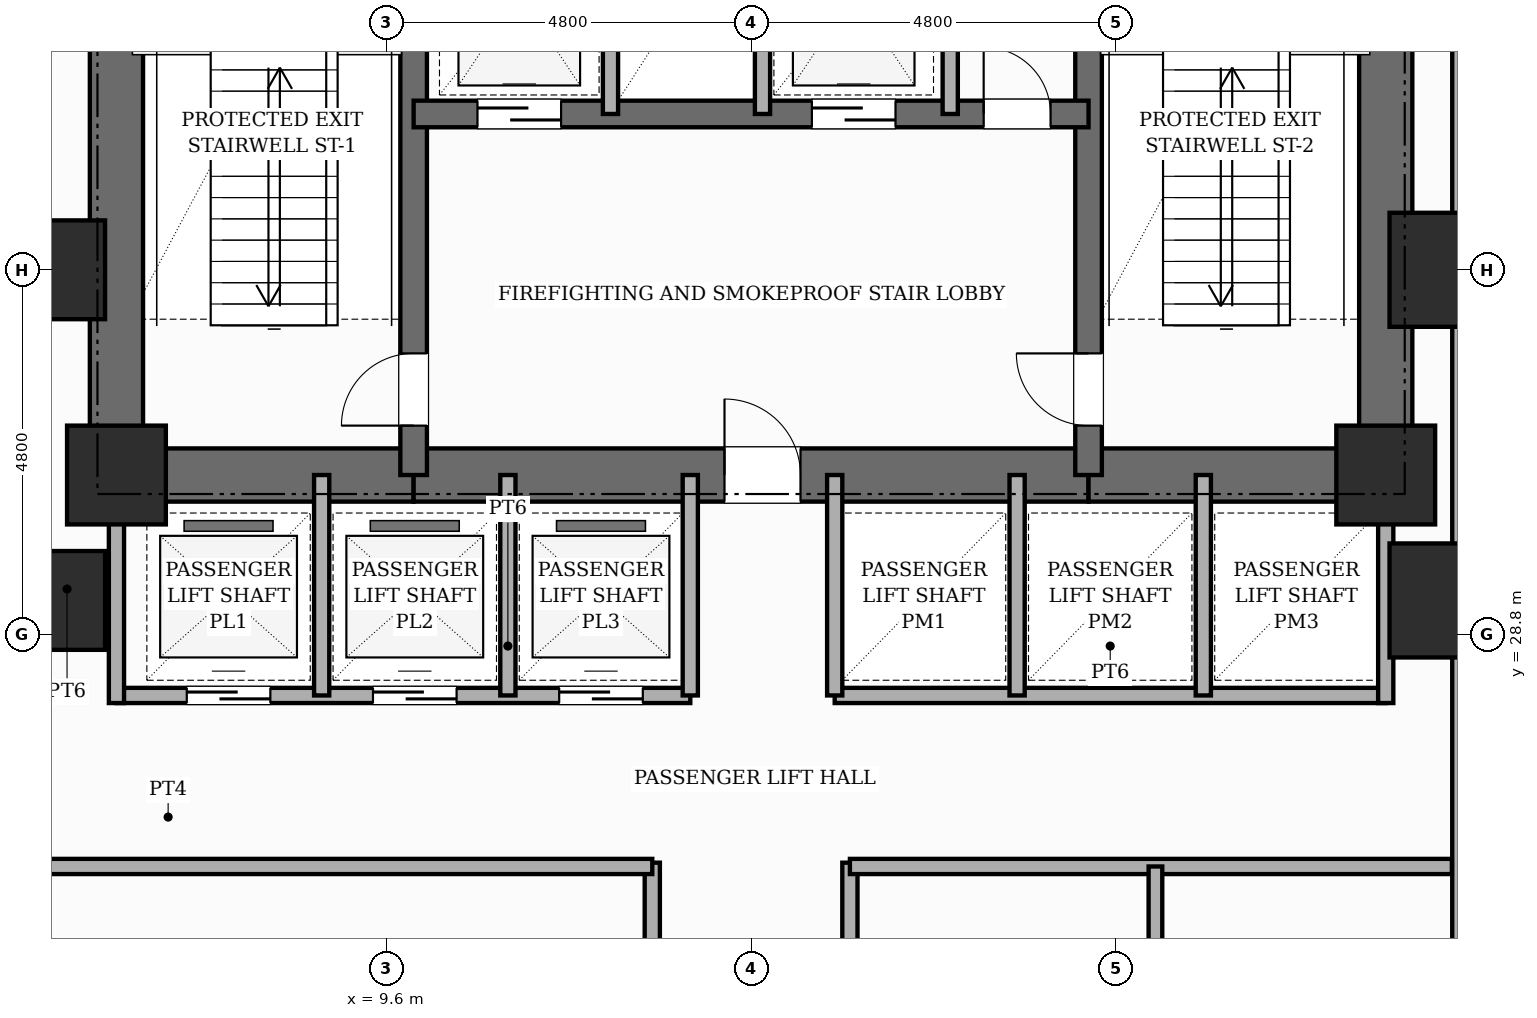
"""IFC4 building model, lengths in metres.
Left out: names, types, materials, properties, quantities, classifications, styles, units other than length and angle.
Written with IfcOpenShell. Run it as: python <this file> out.ifc"""

import sys

from ifc_helpers import new_model, si_unit, direction, frame, frame_2d, origin, origin_2d, place, context, subcontext, project, spatial, rectangle, extrude, element, fill, save


model = new_model("IFC4")
c1 = context("Model", 3, precision=1e-05, world=origin(), true_north=direction((0.0, 1.0)))
c2 = subcontext(c1, "Body", "Model", "MODEL_VIEW")
j1 = project(units=[si_unit("LENGTHUNIT", "METRE"), si_unit("PLANEANGLEUNIT", "RADIAN")], contexts=[c1])
p1 = place(None, origin())
s1 = spatial("IfcSite", under=j1, at=p1, CompositionType="ELEMENT")
p2 = place(p1, origin())
s2 = spatial("IfcBuilding", under=s1, at=p2, CompositionType="ELEMENT")
p3 = place(p2, frame((0.0, 0.0, 5.2)))
s3 = spatial("IfcBuildingStorey", under=s2, at=p3, CompositionType="ELEMENT", Elevation=5.2)
p4 = place(p3, frame((6.05, 30.55, 0.0), z_axis=(0.0, 0.0, 1.0), x_axis=(0.0, 1.0, 0.0)))
e1 = element("IfcWall", 1, at=p4, inside=s3, PredefinedType="SHEAR", context=c2, shape_type="SweptSolid", body=[
    extrude(rectangle(XDim=15.6, YDim=0.7, at=frame_2d((7.8, 0.0))), origin(), (0.0, 0.0, 1.0), 4.8),
])
p5 = place(p3, frame((22.75, 30.55, 0.0), z_axis=(0.0, 0.0, 1.0), x_axis=(0.0, 1.0, 0.0)))
e2 = element("IfcWall", 2, at=p5, inside=s3, PredefinedType="SHEAR", context=c2, shape_type="SweptSolid", body=[
    extrude(rectangle(XDim=15.6, YDim=0.7, at=frame_2d((7.8, 0.0))), origin(), (0.0, 0.0, 1.0), 4.8),
])
p6 = place(p5, frame((10.8, 0.0, 0.0)))
e3 = element("IfcOpeningElement", 3, at=p6, cuts=e2, PredefinedType="OPENING", context=c2, shape_type="SweptSolid", body=[
    extrude(rectangle(XDim=1.0, YDim=2.15, at=frame_2d((0.5, 1.075))), frame((0.0, 0.36, 0.0), z_axis=(0.0, -1.0, 0.0), x_axis=(1.0, 0.0, 0.0)), (0.0, 0.0, 1.0), 0.72),
])
p7 = place(p3, frame((6.05, 30.9, 0.0), z_axis=(0.0, 0.0, 1.0), x_axis=(1.0, 0.0, 0.0)))
e4 = element("IfcWall", 4, at=p7, inside=s3, PredefinedType="SHEAR", context=c2, shape_type="SweptSolid", body=[
    extrude(rectangle(XDim=3.91, YDim=0.7, at=frame_2d((1.955, 0.0))), origin(), (0.0, 0.0, 1.0), 4.8),
])
p8 = place(p3, frame((9.96, 30.9, 0.0), z_axis=(0.0, 0.0, 1.0), x_axis=(1.0, 0.0, 0.0)))
e5 = element("IfcWall", 5, at=p8, inside=s3, PredefinedType="SHEAR", context=c2, shape_type="SweptSolid", body=[
    extrude(rectangle(XDim=8.88, YDim=0.7, at=frame_2d((4.44, 0.0))), origin(), (0.0, 0.0, 1.0), 4.8),
])
p9 = place(p8, frame((4.09, 0.0, 0.0)))
e6 = element("IfcOpeningElement", 6, at=p9, cuts=e5, PredefinedType="OPENING", context=c2, shape_type="SweptSolid", body=[
    extrude(rectangle(XDim=1.0, YDim=2.15, at=frame_2d((0.5, 1.075))), frame((0.0, 0.36, 0.0), z_axis=(0.0, -1.0, 0.0), x_axis=(1.0, 0.0, 0.0)), (0.0, 0.0, 1.0), 0.72),
])
p10 = place(p3, frame((18.84, 30.9, 0.0), z_axis=(0.0, 0.0, 1.0), x_axis=(1.0, 0.0, 0.0)))
e7 = element("IfcWall", 7, at=p10, inside=s3, PredefinedType="SHEAR", context=c2, shape_type="SweptSolid", body=[
    extrude(rectangle(XDim=3.91, YDim=0.7, at=frame_2d((1.955, 0.0))), origin(), (0.0, 0.0, 1.0), 4.8),
])
p11 = place(p3, frame((9.96, 30.9, 0.0), z_axis=(0.0, 0.0, 1.0), x_axis=(0.0, 1.0, 0.0)))
e8 = element("IfcWall", 8, at=p11, inside=s3, PredefinedType="SHEAR", context=c2, shape_type="SweptSolid", body=[
    extrude(rectangle(XDim=14.9, YDim=0.35, at=frame_2d((7.45, 0.0))), origin(), (0.0, 0.0, 1.0), 4.8),
])
p12 = place(p11, frame((0.65, 0.0, 0.0)))
e9 = element("IfcOpeningElement", 9, at=p12, cuts=e8, PredefinedType="OPENING", context=c2, shape_type="SweptSolid", body=[
    extrude(rectangle(XDim=0.95, YDim=2.1, at=frame_2d((0.475, 1.05))), frame((0.0, 0.185, 0.0), z_axis=(0.0, -1.0, 0.0), x_axis=(1.0, 0.0, 0.0)), (0.0, 0.0, 1.0), 0.37),
])
p13 = place(p11, frame((10.45, 0.0, 0.0)))
e10 = element("IfcOpeningElement", 10, at=p13, cuts=e8, PredefinedType="OPENING", context=c2, shape_type="SweptSolid", body=[
    extrude(rectangle(XDim=1.0, YDim=2.15, at=frame_2d((0.5, 1.075))), frame((0.0, 0.185, 0.0), z_axis=(0.0, -1.0, 0.0), x_axis=(1.0, 0.0, 0.0)), (0.0, 0.0, 1.0), 0.37),
])
p14 = place(p3, frame((18.84, 30.9, 0.0), z_axis=(0.0, 0.0, 1.0), x_axis=(0.0, 1.0, 0.0)))
e11 = element("IfcWall", 11, at=p14, inside=s3, PredefinedType="SHEAR", context=c2, shape_type="SweptSolid", body=[
    extrude(rectangle(XDim=14.9, YDim=0.35, at=frame_2d((7.45, 0.0))), origin(), (0.0, 0.0, 1.0), 4.8),
])
p15 = place(p14, frame((0.65, 0.0, 0.0)))
e12 = element("IfcOpeningElement", 12, at=p15, cuts=e11, PredefinedType="OPENING", context=c2, shape_type="SweptSolid", body=[
    extrude(rectangle(XDim=0.95, YDim=2.1, at=frame_2d((0.475, 1.05))), frame((0.0, 0.185, 0.0), z_axis=(0.0, -1.0, 0.0), x_axis=(1.0, 0.0, 0.0)), (0.0, 0.0, 1.0), 0.37),
])
p16 = place(p14, frame((10.45, 0.0, 0.0)))
e13 = element("IfcOpeningElement", 13, at=p16, cuts=e11, PredefinedType="OPENING", context=c2, shape_type="SweptSolid", body=[
    extrude(rectangle(XDim=1.0, YDim=2.15, at=frame_2d((0.5, 1.075))), frame((0.0, 0.185, 0.0), z_axis=(0.0, -1.0, 0.0), x_axis=(1.0, 0.0, 0.0)), (0.0, 0.0, 1.0), 0.37),
])
p17 = place(p3, frame((9.96, 35.65, 0.0), z_axis=(0.0, 0.0, 1.0), x_axis=(1.0, 0.0, 0.0)))
e14 = element("IfcWall", 14, at=p17, inside=s3, PredefinedType="SHEAR", context=c2, shape_type="SweptSolid", body=[
    extrude(rectangle(XDim=8.88, YDim=0.35, at=frame_2d((4.44, 0.0))), origin(), (0.0, 0.0, 1.0), 4.8),
])
p18 = place(p17, frame((0.84, 0.0, 0.0)))
e15 = element("IfcOpeningElement", 15, at=p18, cuts=e14, PredefinedType="OPENING", context=c2, shape_type="SweptSolid", body=[
    extrude(rectangle(XDim=1.1, YDim=2.15, at=frame_2d((0.55, 1.075))), frame((0.0, 0.185, 0.0), z_axis=(0.0, -1.0, 0.0), x_axis=(1.0, 0.0, 0.0)), (0.0, 0.0, 1.0), 0.37),
])
p19 = place(p17, frame((5.24, 0.0, 0.0)))
e16 = element("IfcOpeningElement", 16, at=p19, cuts=e14, PredefinedType="OPENING", context=c2, shape_type="SweptSolid", body=[
    extrude(rectangle(XDim=1.1, YDim=2.15, at=frame_2d((0.55, 1.075))), frame((0.0, 0.185, 0.0), z_axis=(0.0, -1.0, 0.0), x_axis=(1.0, 0.0, 0.0)), (0.0, 0.0, 1.0), 0.37),
])
p20 = place(p17, frame((7.5, 0.0, 0.0)))
e17 = element("IfcOpeningElement", 17, at=p20, cuts=e14, PredefinedType="OPENING", context=c2, shape_type="SweptSolid", body=[
    extrude(rectangle(XDim=0.88, YDim=2.1, at=frame_2d((0.44, 1.05))), frame((0.0, 0.185, 0.0), z_axis=(0.0, -1.0, 0.0), x_axis=(1.0, 0.0, 0.0)), (0.0, 0.0, 1.0), 0.37),
])
for number, where, z_axis, x_axis in (
    (18, (5.25, 29.25, 0.0), (0.0, 0.0, 1.0), (1.0, 0.0, 0.0)),
    (19, (5.25, 33.6, 0.0), (0.0, 0.0, 1.0), (1.0, 0.0, 0.0)),
    (20, (6.05, 30.9, 0.0), (0.0, 0.0, 1.0), (1.0, 0.0, 0.0)),
    (21, (22.75, 30.9, 0.0), (0.0, 0.0, 1.0), (1.0, 0.0, 0.0)),
):
    element("IfcColumn", number, at=place(p3, frame(where, z_axis=z_axis, x_axis=x_axis)), inside=s3, PredefinedType="COLUMN", context=c2, shape_type="SweptSolid", body=[
        extrude(rectangle(XDim=1.3, YDim=1.3, at=origin_2d()), origin(), (0.0, 0.0, 1.0), 4.8),
    ])
for number, where, z_axis, x_axis in (
    (22, (23.55, 29.25, 0.0), (0.0, 0.0, 1.0), (1.0, 0.0, 0.0)),
    (23, (23.55, 33.6, 0.0), (0.0, 0.0, 1.0), (1.0, 0.0, 0.0)),
):
    element("IfcColumn", number, at=place(p3, frame(where, z_axis=z_axis, x_axis=x_axis)), inside=s3, PredefinedType="USERDEFINED", context=c2, shape_type="SweptSolid", body=[
        extrude(rectangle(XDim=1.5, YDim=1.5, at=origin_2d()), origin(), (0.0, 0.0, 1.0), 4.8),
    ])
p21 = place(p3, frame((23.825, 48.0, 0.0), z_axis=(0.0, 0.0, 1.0), x_axis=(0.0, -1.0, 0.0)))
e24 = element("IfcWall", 24, at=p21, inside=s3, PredefinedType="SOLIDWALL", context=c2, shape_type="SweptSolid", body=[
    extrude(rectangle(XDim=30.24, YDim=0.4, at=frame_2d((15.12, 0.0))), origin(), (0.0, 0.0, 1.0), 3.6),
])
p22 = place(p21, frame((25.65, 0.0, 0.85)))
e25 = element("IfcOpeningElement", 25, at=p22, cuts=e24, PredefinedType="OPENING", context=c2, shape_type="SweptSolid", body=[
    extrude(rectangle(XDim=1.5, YDim=2.1, at=frame_2d((0.75, 1.05))), frame((0.0, 0.21, 0.0), z_axis=(0.0, -1.0, 0.0), x_axis=(1.0, 0.0, 0.0)), (0.0, 0.0, 1.0), 0.42),
])
for number, where, z_axis, x_axis in (
    (26, (12.55, 35.65, 0.0), (0.0, 0.0, 1.0), (0.0, 1.0, 0.0)),
    (27, (14.55, 35.65, 0.0), (0.0, 0.0, 1.0), (0.0, 1.0, 0.0)),
):
    element("IfcWall", number, at=place(p3, frame(where, z_axis=z_axis, x_axis=x_axis)), inside=s3, PredefinedType="POLYGONAL", context=c2, shape_type="SweptSolid", body=[
        extrude(rectangle(XDim=3.07, YDim=0.2, at=frame_2d((1.535, 0.0))), origin(), (0.0, 0.0, 1.0), 4.52),
    ])
p23 = place(p3, frame((17.02, 35.65, 0.0), z_axis=(0.0, 0.0, 1.0), x_axis=(0.0, 1.0, 0.0)))
e28 = element("IfcWall", 28, at=p23, inside=s3, PredefinedType="POLYGONAL", context=c2, shape_type="SweptSolid", body=[
    extrude(rectangle(XDim=5.15, YDim=0.2, at=frame_2d((2.575, 0.0))), origin(), (0.0, 0.0, 1.0), 4.52),
])
p24 = place(p3, frame((6.05, 28.0, 0.0), z_axis=(0.0, 0.0, 1.0), x_axis=(1.0, 0.0, 0.0)))
e29 = element("IfcWall", 29, at=p24, inside=s3, PredefinedType="POLYGONAL", context=c2, shape_type="SweptSolid", body=[
    extrude(rectangle(XDim=7.55, YDim=0.2, at=frame_2d((3.775, 0.0))), origin(), (0.0, 0.0, 1.0), 4.52),
])
p25 = place(p24, frame((0.925, 0.0, 0.0)))
e30 = element("IfcOpeningElement", 30, at=p25, cuts=e29, PredefinedType="OPENING", context=c2, shape_type="SweptSolid", body=[
    extrude(rectangle(XDim=1.1, YDim=2.15, at=frame_2d((0.55, 1.075))), frame((0.0, 0.11, 0.0), z_axis=(0.0, -1.0, 0.0), x_axis=(1.0, 0.0, 0.0)), (0.0, 0.0, 1.0), 0.22),
])
p26 = place(p24, frame((3.375, 0.0, 0.0)))
e31 = element("IfcOpeningElement", 31, at=p26, cuts=e29, PredefinedType="OPENING", context=c2, shape_type="SweptSolid", body=[
    extrude(rectangle(XDim=1.1, YDim=2.15, at=frame_2d((0.55, 1.075))), frame((0.0, 0.11, 0.0), z_axis=(0.0, -1.0, 0.0), x_axis=(1.0, 0.0, 0.0)), (0.0, 0.0, 1.0), 0.22),
])
p27 = place(p24, frame((5.825, 0.0, 0.0)))
e32 = element("IfcOpeningElement", 32, at=p27, cuts=e29, PredefinedType="OPENING", context=c2, shape_type="SweptSolid", body=[
    extrude(rectangle(XDim=1.1, YDim=2.15, at=frame_2d((0.55, 1.075))), frame((0.0, 0.11, 0.0), z_axis=(0.0, -1.0, 0.0), x_axis=(1.0, 0.0, 0.0)), (0.0, 0.0, 1.0), 0.22),
])
p28 = place(p3, frame((15.5, 28.0, 0.0), z_axis=(0.0, 0.0, 1.0), x_axis=(1.0, 0.0, 0.0)))
e33 = element("IfcWall", 33, at=p28, inside=s3, PredefinedType="POLYGONAL", context=c2, shape_type="SweptSolid", body=[
    extrude(rectangle(XDim=7.25, YDim=0.2, at=frame_2d((3.625, 0.0))), origin(), (0.0, 0.0, 1.0), 4.52),
])
for number, where, z_axis, x_axis in (
    (34, (6.05, 27.9, 0.0), (0.0, 0.0, 1.0), (0.0, 1.0, 0.0)),
    (35, (22.75, 27.9, 0.0), (0.0, 0.0, 1.0), (0.0, 1.0, 0.0)),
):
    element("IfcWall", number, at=place(p3, frame(where, z_axis=z_axis, x_axis=x_axis)), inside=s3, PredefinedType="POLYGONAL", context=c2, shape_type="SweptSolid", body=[
        extrude(rectangle(XDim=3.0, YDim=0.2, at=frame_2d((1.5, 0.0))), origin(), (0.0, 0.0, 1.0), 4.52),
    ])
for number, where, z_axis, x_axis in (
    (36, (13.6, 28.0, 0.0), (0.0, 0.0, 1.0), (0.0, 1.0, 0.0)),
    (37, (15.5, 28.0, 0.0), (0.0, 0.0, 1.0), (0.0, 1.0, 0.0)),
    (38, (8.75, 28.0, 0.0), (0.0, 0.0, 1.0), (0.0, 1.0, 0.0)),
    (39, (11.2, 28.0, 0.0), (0.0, 0.0, 1.0), (0.0, 1.0, 0.0)),
    (40, (17.9, 28.0, 0.0), (0.0, 0.0, 1.0), (0.0, 1.0, 0.0)),
    (41, (20.35, 28.0, 0.0), (0.0, 0.0, 1.0), (0.0, 1.0, 0.0)),
):
    element("IfcWall", number, at=place(p3, frame(where, z_axis=z_axis, x_axis=x_axis)), inside=s3, PredefinedType="POLYGONAL", context=c2, shape_type="SweptSolid", body=[
        extrude(rectangle(XDim=2.9, YDim=0.2, at=frame_2d((1.45, 0.0))), origin(), (0.0, 0.0, 1.0), 4.52),
    ])
p29 = place(p3, frame((13.1, 5.16, 0.0), z_axis=(0.0, 0.0, 1.0), x_axis=(0.0, 1.0, 0.0)))
e42 = element("IfcWall", 42, at=p29, inside=s3, PredefinedType="PARTITIONING", context=c2, shape_type="SweptSolid", body=[
    extrude(rectangle(XDim=20.64, YDim=0.2, at=frame_2d((10.32, 0.0))), origin(), (0.0, 0.0, 1.0), 4.52),
])
p30 = place(p29, frame((5.02, 0.0, 0.0)))
e43 = element("IfcOpeningElement", 43, at=p30, cuts=e42, PredefinedType="OPENING", context=c2, shape_type="SweptSolid", body=[
    extrude(rectangle(XDim=0.98, YDim=2.18, at=frame_2d((0.49, 1.09))), frame((0.0, 0.11, 0.0), z_axis=(0.0, -1.0, 0.0), x_axis=(1.0, 0.0, 0.0)), (0.0, 0.0, 1.0), 0.22),
])
p31 = place(p29, frame((14.62, 0.0, 0.0)))
e44 = element("IfcOpeningElement", 44, at=p31, cuts=e42, PredefinedType="OPENING", context=c2, shape_type="SweptSolid", body=[
    extrude(rectangle(XDim=0.95, YDim=2.15, at=frame_2d((0.475, 1.075))), frame((0.0, 0.11, 0.0), z_axis=(0.0, -1.0, 0.0), x_axis=(1.0, 0.0, 0.0)), (0.0, 0.0, 1.0), 0.22),
])
p32 = place(p3, frame((15.7, 5.16, 0.0), z_axis=(0.0, 0.0, 1.0), x_axis=(0.0, 1.0, 0.0)))
e45 = element("IfcWall", 45, at=p32, inside=s3, PredefinedType="PARTITIONING", context=c2, shape_type="SweptSolid", body=[
    extrude(rectangle(XDim=20.64, YDim=0.2, at=frame_2d((10.32, 0.0))), origin(), (0.0, 0.0, 1.0), 4.52),
])
p33 = place(p32, frame((6.02, 0.0, 0.0)))
e46 = element("IfcOpeningElement", 46, at=p33, cuts=e45, PredefinedType="OPENING", context=c2, shape_type="SweptSolid", body=[
    extrude(rectangle(XDim=0.98, YDim=2.18, at=frame_2d((0.49, 1.09))), frame((0.0, 0.11, 0.0), z_axis=(0.0, -1.0, 0.0), x_axis=(1.0, 0.0, 0.0)), (0.0, 0.0, 1.0), 0.22),
])
p34 = place(p32, frame((15.02, 0.0, 0.0)))
e47 = element("IfcOpeningElement", 47, at=p34, cuts=e45, PredefinedType="OPENING", context=c2, shape_type="SweptSolid", body=[
    extrude(rectangle(XDim=0.86, YDim=2.1, at=frame_2d((0.43, 1.05))), frame((0.0, 0.11, 0.0), z_axis=(0.0, -1.0, 0.0), x_axis=(1.0, 0.0, 0.0)), (0.0, 0.0, 1.0), 0.22),
])
p35 = place(p3, frame((0.36, 25.75, 0.0), z_axis=(0.0, 0.0, 1.0), x_axis=(1.0, 0.0, 0.0)))
e48 = element("IfcWall", 48, at=p35, inside=s3, PredefinedType="PARTITIONING", context=c2, shape_type="SweptSolid", body=[
    extrude(rectangle(XDim=12.74, YDim=0.2, at=frame_2d((6.37, 0.0))), origin(), (0.0, 0.0, 1.0), 4.52),
])
p36 = place(p3, frame((15.7, 25.75, 0.0), z_axis=(0.0, 0.0, 1.0), x_axis=(1.0, 0.0, 0.0)))
e49 = element("IfcWall", 49, at=p36, inside=s3, PredefinedType="PARTITIONING", context=c2, shape_type="SweptSolid", body=[
    extrude(rectangle(XDim=7.92, YDim=0.2, at=frame_2d((3.96, 0.0))), origin(), (0.0, 0.0, 1.0), 4.52),
])
p37 = place(p3, frame((19.72, 18.92, 0.0), z_axis=(0.0, 0.0, 1.0), x_axis=(0.0, 1.0, 0.0)))
e50 = element("IfcWall", 50, at=p37, inside=s3, PredefinedType="PLUMBINGWALL", context=c2, shape_type="SweptSolid", body=[
    extrude(rectangle(XDim=6.83, YDim=0.18, at=frame_2d((3.415, 0.0))), origin(), (0.0, 0.0, 1.0), 4.52),
])
p38 = place(p37, frame((2.2, 0.0, 0.0)))
e51 = element("IfcOpeningElement", 51, at=p38, cuts=e50, PredefinedType="OPENING", context=c2, shape_type="SweptSolid", body=[
    extrude(rectangle(XDim=0.86, YDim=2.1, at=frame_2d((0.43, 1.05))), frame((0.0, 0.1, 0.0), z_axis=(0.0, -1.0, 0.0), x_axis=(1.0, 0.0, 0.0)), (0.0, 0.0, 1.0), 0.2),
])
p39 = place(p12, origin())
e52 = element("IfcDoor", 52, at=p39, inside=s3, OperationType="SINGLE_SWING_LEFT", PredefinedType="DOOR", context=c2, shape_type="SweptSolid", body=[
    extrude(rectangle(XDim=0.95, YDim=2.1, at=frame_2d((0.475, 1.05))), frame((0.0, 0.025, 0.0), z_axis=(0.0, -1.0, 0.0), x_axis=(1.0, 0.0, 0.0)), (0.0, 0.0, 1.0), 0.05),
])
fill(e9, e52)
p40 = place(p15, origin())
e53 = element("IfcDoor", 53, at=p40, inside=s3, OperationType="SINGLE_SWING_RIGHT", PredefinedType="DOOR", context=c2, shape_type="SweptSolid", body=[
    extrude(rectangle(XDim=0.95, YDim=2.1, at=frame_2d((0.475, 1.05))), frame((0.0, 0.025, 0.0), z_axis=(0.0, -1.0, 0.0), x_axis=(1.0, 0.0, 0.0)), (0.0, 0.0, 1.0), 0.05),
])
fill(e12, e53)
p41 = place(p9, origin())
e54 = element("IfcDoor", 54, at=p41, inside=s3, OperationType="SINGLE_SWING_LEFT", PredefinedType="DOOR", context=c2, shape_type="SweptSolid", body=[
    extrude(rectangle(XDim=1.0, YDim=2.15, at=frame_2d((0.5, 1.075))), frame((0.0, 0.025, 0.0), z_axis=(0.0, -1.0, 0.0), x_axis=(1.0, 0.0, 0.0)), (0.0, 0.0, 1.0), 0.05),
])
fill(e6, e54)
p42 = place(p18, origin())
e55 = element("IfcDoor", 55, at=p42, inside=s3, OperationType="SLIDING_TO_LEFT", PredefinedType="DOOR", context=c2, shape_type="SweptSolid", body=[
    extrude(rectangle(XDim=1.1, YDim=2.15, at=frame_2d((0.55, 1.075))), frame((0.0, 0.025, 0.0), z_axis=(0.0, -1.0, 0.0), x_axis=(1.0, 0.0, 0.0)), (0.0, 0.0, 1.0), 0.05),
])
fill(e15, e55)
p43 = place(p19, origin())
e56 = element("IfcDoor", 56, at=p43, inside=s3, OperationType="SLIDING_TO_RIGHT", PredefinedType="DOOR", context=c2, shape_type="SweptSolid", body=[
    extrude(rectangle(XDim=1.1, YDim=2.15, at=frame_2d((0.55, 1.075))), frame((0.0, 0.025, 0.0), z_axis=(0.0, -1.0, 0.0), x_axis=(1.0, 0.0, 0.0)), (0.0, 0.0, 1.0), 0.05),
])
fill(e16, e56)
p44 = place(p20, origin())
e57 = element("IfcDoor", 57, at=p44, inside=s3, OperationType="SINGLE_SWING_LEFT", PredefinedType="DOOR", context=c2, shape_type="SweptSolid", body=[
    extrude(rectangle(XDim=0.88, YDim=2.1, at=frame_2d((0.44, 1.05))), frame((0.0, 0.025, 0.0), z_axis=(0.0, -1.0, 0.0), x_axis=(1.0, 0.0, 0.0)), (0.0, 0.0, 1.0), 0.05),
])
fill(e17, e57)
p45 = place(p25, origin())
e58 = element("IfcDoor", 58, at=p45, inside=s3, OperationType="SLIDING_TO_LEFT", PredefinedType="DOOR", context=c2, shape_type="SweptSolid", body=[
    extrude(rectangle(XDim=1.1, YDim=2.15, at=frame_2d((0.55, 1.075))), frame((0.0, 0.025, 0.0), z_axis=(0.0, -1.0, 0.0), x_axis=(1.0, 0.0, 0.0)), (0.0, 0.0, 1.0), 0.05),
])
fill(e30, e58)
p46 = place(p26, origin())
e59 = element("IfcDoor", 59, at=p46, inside=s3, OperationType="SLIDING_TO_RIGHT", PredefinedType="DOOR", context=c2, shape_type="SweptSolid", body=[
    extrude(rectangle(XDim=1.1, YDim=2.15, at=frame_2d((0.55, 1.075))), frame((0.0, 0.025, 0.0), z_axis=(0.0, -1.0, 0.0), x_axis=(1.0, 0.0, 0.0)), (0.0, 0.0, 1.0), 0.05),
])
fill(e31, e59)
p47 = place(p27, origin())
e60 = element("IfcDoor", 60, at=p47, inside=s3, OperationType="SLIDING_TO_LEFT", PredefinedType="DOOR", context=c2, shape_type="SweptSolid", body=[
    extrude(rectangle(XDim=1.1, YDim=2.15, at=frame_2d((0.55, 1.075))), frame((0.0, 0.025, 0.0), z_axis=(0.0, -1.0, 0.0), x_axis=(1.0, 0.0, 0.0)), (0.0, 0.0, 1.0), 0.05),
])
fill(e32, e60)
save(model, sys.argv[1])
